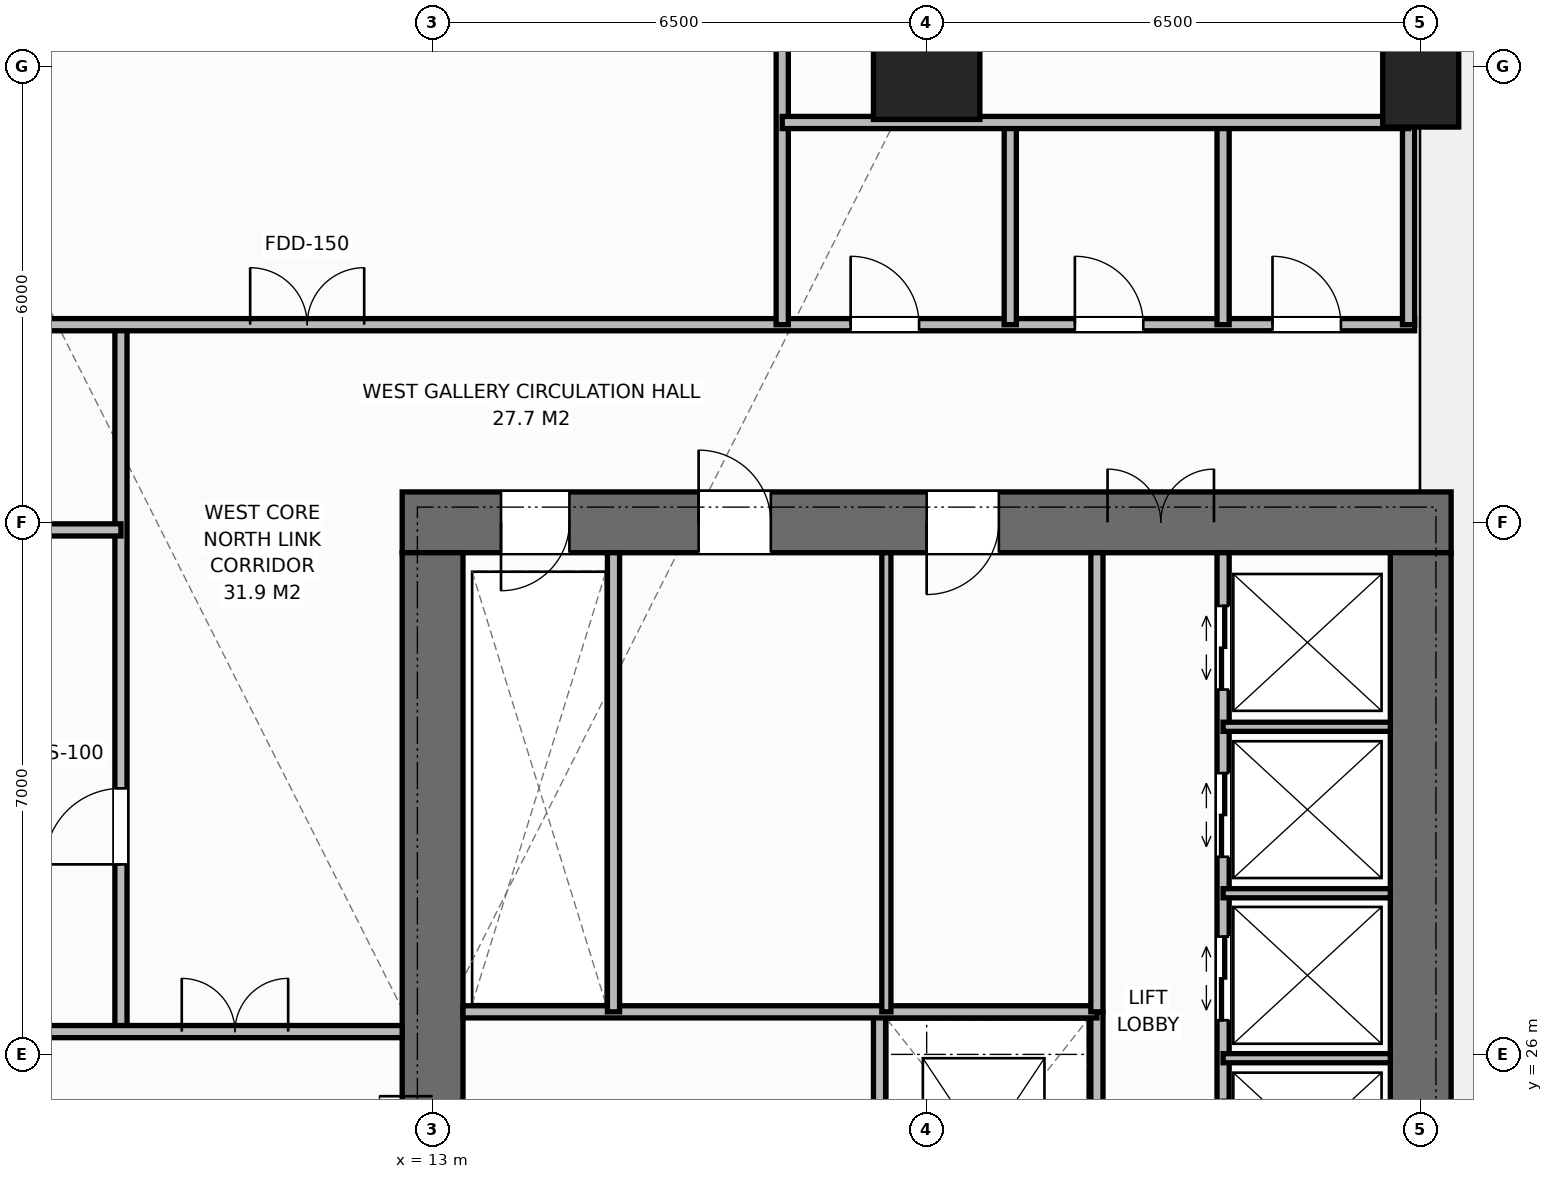
"""IFC4 building model, lengths in metres.
Left out: names, types, materials, properties, quantities, classifications, styles, units other than length and angle.
Written with IfcOpenShell. Run it as: python <this file> out.ifc"""

import sys

from ifc_helpers import new_model, si_unit, direction, frame, frame_2d, origin, origin_2d, place, context, subcontext, project, spatial, rectangle, extrude, element, fill, save


model = new_model("IFC4")
c1 = context("Model", 3, precision=1e-05, world=origin(), true_north=direction((0.0, 1.0)))
c2 = subcontext(c1, "Body", "Model", "MODEL_VIEW")
j1 = project(units=[si_unit("LENGTHUNIT", "METRE"), si_unit("PLANEANGLEUNIT", "RADIAN")], contexts=[c1])
p1 = place(None, origin())
s1 = spatial("IfcSite", under=j1, at=p1, CompositionType="ELEMENT")
p2 = place(p1, origin())
s2 = spatial("IfcBuilding", under=s1, at=p2, CompositionType="ELEMENT")
p3 = place(p2, origin())
s3 = spatial("IfcBuildingStorey", under=s2, at=p3, CompositionType="ELEMENT", Elevation=0.0)
p4 = place(p3, frame((12.6, 33.0, 0.0), z_axis=(0.0, 0.0, 1.0), x_axis=(1.0, 0.0, 0.0)))
e1 = element("IfcWall", 1, at=p4, inside=s3, PredefinedType="SHEAR", context=c2, shape_type="SweptSolid", body=[
    extrude(rectangle(XDim=13.8, YDim=0.8, at=frame_2d((6.9, 0.0))), origin(), (0.0, 0.0, 1.0), 6.0),
])
p5 = place(p4, frame((1.3, 0.0, 0.0)))
e2 = element("IfcOpeningElement", 2, at=p5, cuts=e1, PredefinedType="OPENING", context=c2, shape_type="SweptSolid", body=[
    extrude(rectangle(XDim=0.9, YDim=2.15, at=frame_2d((0.45, 1.075))), frame((0.0, 0.41, 0.0), z_axis=(0.0, -1.0, 0.0), x_axis=(1.0, 0.0, 0.0)), (0.0, 0.0, 1.0), 0.82),
])
p6 = place(p4, frame((3.9, 0.0, 0.0)))
e3 = element("IfcOpeningElement", 3, at=p6, cuts=e1, PredefinedType="OPENING", context=c2, shape_type="SweptSolid", body=[
    extrude(rectangle(XDim=0.95, YDim=2.15, at=frame_2d((0.475, 1.075))), frame((0.0, 0.41, 0.0), z_axis=(0.0, -1.0, 0.0), x_axis=(1.0, 0.0, 0.0)), (0.0, 0.0, 1.0), 0.82),
])
p7 = place(p4, frame((6.9, 0.0, 0.0)))
e4 = element("IfcOpeningElement", 4, at=p7, cuts=e1, PredefinedType="OPENING", context=c2, shape_type="SweptSolid", body=[
    extrude(rectangle(XDim=0.95, YDim=2.15, at=frame_2d((0.475, 1.075))), frame((0.0, 0.41, 0.0), z_axis=(0.0, -1.0, 0.0), x_axis=(1.0, 0.0, 0.0)), (0.0, 0.0, 1.0), 0.82),
])
p8 = place(p4, frame((9.28, 0.0, 0.0)))
e5 = element("IfcOpeningElement", 5, at=p8, cuts=e1, PredefinedType="OPENING", context=c2, shape_type="SweptSolid", body=[
    extrude(rectangle(XDim=1.4, YDim=2.2, at=frame_2d((0.7, 1.1))), frame((0.0, 0.41, 0.0), z_axis=(0.0, -1.0, 0.0), x_axis=(1.0, 0.0, 0.0)), (0.0, 0.0, 1.0), 0.82),
])
p9 = place(p3, frame((13.0, 19.4, 0.0), z_axis=(0.0, 0.0, 1.0), x_axis=(0.0, 1.0, 0.0)))
e6 = element("IfcWall", 6, at=p9, inside=s3, PredefinedType="SHEAR", context=c2, shape_type="SweptSolid", body=[
    extrude(rectangle(XDim=13.2, YDim=0.8, at=frame_2d((6.6, 0.0))), origin(), (0.0, 0.0, 1.0), 6.0),
])
p10 = place(p9, frame((4.65, 0.0, 0.0)))
e7 = element("IfcOpeningElement", 7, at=p10, cuts=e6, PredefinedType="OPENING", context=c2, shape_type="SweptSolid", body=[
    extrude(rectangle(XDim=1.4, YDim=2.2, at=frame_2d((0.7, 1.1))), frame((0.0, 0.41, 0.0), z_axis=(0.0, -1.0, 0.0), x_axis=(1.0, 0.0, 0.0)), (0.0, 0.0, 1.0), 0.82),
])
p11 = place(p3, frame((26.0, 19.4, 0.0), z_axis=(0.0, 0.0, 1.0), x_axis=(0.0, 1.0, 0.0)))
e8 = element("IfcWall", 8, at=p11, inside=s3, PredefinedType="SHEAR", context=c2, shape_type="SweptSolid", body=[
    extrude(rectangle(XDim=13.2, YDim=0.8, at=frame_2d((6.6, 0.0))), origin(), (0.0, 0.0, 1.0), 6.0),
])
p12 = place(p3, frame((19.5, 39.0, 0.0), z_axis=(0.0, 0.0, 1.0), x_axis=(1.0, 0.0, 0.0)))
e9 = element("IfcColumn", 9, at=p12, inside=s3, PredefinedType="COLUMN", context=c2, shape_type="SweptSolid", body=[
    extrude(rectangle(XDim=1.4, YDim=1.4, at=origin_2d()), origin(), (0.0, 0.0, 1.0), 6.0),
])
p13 = place(p3, frame((26.0, 39.0, 0.0), z_axis=(0.0, 0.0, 1.0), x_axis=(1.0, 0.0, 0.0)))
e10 = element("IfcColumn", 10, at=p13, inside=s3, PredefinedType="PILASTER", context=c2, shape_type="SweptSolid", body=[
    extrude(rectangle(XDim=1.0, YDim=1.6, at=origin_2d()), origin(), (0.0, 0.0, 1.0), 6.0),
])
p14 = place(p3, frame((21.74, 23.09, 0.0), z_axis=(0.0, 0.0, 1.0), x_axis=(0.0, 1.0, 0.0)))
e11 = element("IfcWall", 11, at=p14, inside=s3, PredefinedType="STANDARD", context=c2, shape_type="SweptSolid", body=[
    extrude(rectangle(XDim=3.47, YDim=0.16, at=frame_2d((1.735, 0.0))), origin(), (0.0, 0.0, 1.0), 5.72),
])
p15 = place(p3, frame((18.88, 23.09, 0.0), z_axis=(0.0, 0.0, 1.0), x_axis=(0.0, 1.0, 0.0)))
e12 = element("IfcWall", 12, at=p15, inside=s3, PredefinedType="STANDARD", context=c2, shape_type="SweptSolid", body=[
    extrude(rectangle(XDim=3.47, YDim=0.16, at=frame_2d((1.735, 0.0))), origin(), (0.0, 0.0, 1.0), 5.72),
])
p16 = place(p15, frame((1.1, 0.0, 0.0)))
e13 = element("IfcOpeningElement", 13, at=p16, cuts=e12, PredefinedType="OPENING", context=c2, shape_type="SweptSolid", body=[
    extrude(rectangle(XDim=1.1, YDim=2.2, at=frame_2d((0.55, 1.1))), frame((0.0, 0.09, 0.0), z_axis=(0.0, -1.0, 0.0), x_axis=(1.0, 0.0, 0.0)), (0.0, 0.0, 1.0), 0.18),
])
p17 = place(p3, frame((13.4, 26.56, 0.0), z_axis=(0.0, 0.0, 1.0), x_axis=(1.0, 0.0, 0.0)))
e14 = element("IfcWall", 14, at=p17, inside=s3, PredefinedType="STANDARD", context=c2, shape_type="SweptSolid", body=[
    extrude(rectangle(XDim=8.34, YDim=0.16, at=frame_2d((4.17, 0.0))), origin(), (0.0, 0.0, 1.0), 5.72),
])
p18 = place(p3, frame((15.38, 26.56, 0.0), z_axis=(0.0, 0.0, 1.0), x_axis=(0.0, 1.0, 0.0)))
e15 = element("IfcWall", 15, at=p18, inside=s3, PredefinedType="STANDARD", context=c2, shape_type="SweptSolid", body=[
    extrude(rectangle(XDim=6.04, YDim=0.16, at=frame_2d((3.02, 0.0))), origin(), (0.0, 0.0, 1.0), 5.72),
])
p19 = place(p3, frame((18.97, 26.56, 0.0), z_axis=(0.0, 0.0, 1.0), x_axis=(0.0, 1.0, 0.0)))
e16 = element("IfcWall", 16, at=p19, inside=s3, PredefinedType="PARTITIONING", context=c2, shape_type="SweptSolid", body=[
    extrude(rectangle(XDim=6.04, YDim=0.12, at=frame_2d((3.02, 0.0))), origin(), (0.0, 0.0, 1.0), 5.72),
])
p20 = place(p3, frame((21.74, 26.56, 0.0), z_axis=(0.0, 0.0, 1.0), x_axis=(0.0, 1.0, 0.0)))
e17 = element("IfcWall", 17, at=p20, inside=s3, PredefinedType="STANDARD", context=c2, shape_type="SweptSolid", body=[
    extrude(rectangle(XDim=6.04, YDim=0.16, at=frame_2d((3.02, 0.0))), origin(), (0.0, 0.0, 1.0), 5.72),
])
p21 = place(p3, frame((23.4, 19.4, 0.0), z_axis=(0.0, 0.0, 1.0), x_axis=(0.0, 1.0, 0.0)))
e18 = element("IfcWall", 18, at=p21, inside=s3, PredefinedType="STANDARD", context=c2, shape_type="SweptSolid", body=[
    extrude(rectangle(XDim=13.2, YDim=0.16, at=frame_2d((6.6, 0.0))), origin(), (0.0, 0.0, 1.0), 5.72),
])
p22 = place(p21, frame((0.55, 0.0, 0.0)))
e19 = element("IfcOpeningElement", 19, at=p22, cuts=e18, PredefinedType="OPENING", context=c2, shape_type="SweptSolid", body=[
    extrude(rectangle(XDim=1.1, YDim=2.2, at=frame_2d((0.55, 1.1))), frame((0.0, 0.09, 0.0), z_axis=(0.0, -1.0, 0.0), x_axis=(1.0, 0.0, 0.0)), (0.0, 0.0, 1.0), 0.18),
])
p23 = place(p21, frame((2.7, 0.0, 0.0)))
e20 = element("IfcOpeningElement", 20, at=p23, cuts=e18, PredefinedType="OPENING", context=c2, shape_type="SweptSolid", body=[
    extrude(rectangle(XDim=1.1, YDim=2.2, at=frame_2d((0.55, 1.1))), frame((0.0, 0.09, 0.0), z_axis=(0.0, -1.0, 0.0), x_axis=(1.0, 0.0, 0.0)), (0.0, 0.0, 1.0), 0.18),
])
p24 = place(p21, frame((4.9, 0.0, 0.0)))
e21 = element("IfcOpeningElement", 21, at=p24, cuts=e18, PredefinedType="OPENING", context=c2, shape_type="SweptSolid", body=[
    extrude(rectangle(XDim=1.1, YDim=2.2, at=frame_2d((0.55, 1.1))), frame((0.0, 0.09, 0.0), z_axis=(0.0, -1.0, 0.0), x_axis=(1.0, 0.0, 0.0)), (0.0, 0.0, 1.0), 0.18),
])
p25 = place(p21, frame((7.05, 0.0, 0.0)))
e22 = element("IfcOpeningElement", 22, at=p25, cuts=e18, PredefinedType="OPENING", context=c2, shape_type="SweptSolid", body=[
    extrude(rectangle(XDim=1.1, YDim=2.2, at=frame_2d((0.55, 1.1))), frame((0.0, 0.09, 0.0), z_axis=(0.0, -1.0, 0.0), x_axis=(1.0, 0.0, 0.0)), (0.0, 0.0, 1.0), 0.18),
])
p26 = place(p21, frame((9.2, 0.0, 0.0)))
e23 = element("IfcOpeningElement", 23, at=p26, cuts=e18, PredefinedType="OPENING", context=c2, shape_type="SweptSolid", body=[
    extrude(rectangle(XDim=1.1, YDim=2.2, at=frame_2d((0.55, 1.1))), frame((0.0, 0.09, 0.0), z_axis=(0.0, -1.0, 0.0), x_axis=(1.0, 0.0, 0.0)), (0.0, 0.0, 1.0), 0.18),
])
p27 = place(p21, frame((11.4, 0.0, 0.0)))
e24 = element("IfcOpeningElement", 24, at=p27, cuts=e18, PredefinedType="OPENING", context=c2, shape_type="SweptSolid", body=[
    extrude(rectangle(XDim=1.1, YDim=2.2, at=frame_2d((0.55, 1.1))), frame((0.0, 0.09, 0.0), z_axis=(0.0, -1.0, 0.0), x_axis=(1.0, 0.0, 0.0)), (0.0, 0.0, 1.0), 0.18),
])
for number, where, z_axis, x_axis in (
    (25, (23.4, 25.95, 0.0), (0.0, 0.0, 1.0), (1.0, 0.0, 0.0)),
    (26, (23.4, 28.12, 0.0), (0.0, 0.0, 1.0), (1.0, 0.0, 0.0)),
    (27, (23.4, 30.31, 0.0), (0.0, 0.0, 1.0), (1.0, 0.0, 0.0)),
):
    element("IfcWall", number, at=place(p3, frame(where, z_axis=z_axis, x_axis=x_axis)), inside=s3, PredefinedType="PARTITIONING", context=c2, shape_type="SweptSolid", body=[
        extrude(rectangle(XDim=2.2, YDim=0.12, at=frame_2d((1.1, 0.0))), origin(), (0.0, 0.0, 1.0), 5.72),
    ])
p28 = place(p3, frame((8.9, 26.3, 0.0), z_axis=(0.0, 0.0, 1.0), x_axis=(0.0, 1.0, 0.0)))
e28 = element("IfcWall", 28, at=p28, inside=s3, PredefinedType="STANDARD", context=c2, shape_type="SweptSolid", body=[
    extrude(rectangle(XDim=9.3, YDim=0.16, at=frame_2d((4.65, 0.0))), origin(), (0.0, 0.0, 1.0), 5.72),
])
p29 = place(p28, frame((2.2, 0.0, 0.0)))
e29 = element("IfcOpeningElement", 29, at=p29, cuts=e28, PredefinedType="OPENING", context=c2, shape_type="SweptSolid", body=[
    extrude(rectangle(XDim=1.0, YDim=2.15, at=frame_2d((0.5, 1.075))), frame((0.0, 0.09, 0.0), z_axis=(0.0, -1.0, 0.0), x_axis=(1.0, 0.0, 0.0)), (0.0, 0.0, 1.0), 0.18),
])
p30 = place(p3, frame((0.1, 32.9, 0.0), z_axis=(0.0, 0.0, 1.0), x_axis=(1.0, 0.0, 0.0)))
e30 = element("IfcWall", 30, at=p30, inside=s3, PredefinedType="STANDARD", context=c2, shape_type="SweptSolid", body=[
    extrude(rectangle(XDim=8.8, YDim=0.16, at=frame_2d((4.4, 0.0))), origin(), (0.0, 0.0, 1.0), 4.92),
])
p31 = place(p3, frame((0.1, 35.6, 0.0), z_axis=(0.0, 0.0, 1.0), x_axis=(1.0, 0.0, 0.0)))
e31 = element("IfcWall", 31, at=p31, inside=s3, PredefinedType="STANDARD", context=c2, shape_type="SweptSolid", body=[
    extrude(rectangle(XDim=25.82, YDim=0.16, at=frame_2d((12.91, 0.0))), origin(), (0.0, 0.0, 1.0), 5.72),
])
p32 = place(p31, frame((10.5, 0.0, 0.0)))
e32 = element("IfcOpeningElement", 32, at=p32, cuts=e31, PredefinedType="OPENING", context=c2, shape_type="SweptSolid", body=[
    extrude(rectangle(XDim=1.5, YDim=2.2, at=frame_2d((0.75, 1.1))), frame((0.0, 0.09, 0.0), z_axis=(0.0, -1.0, 0.0), x_axis=(1.0, 0.0, 0.0)), (0.0, 0.0, 1.0), 0.18),
])
p33 = place(p31, frame((18.4, 0.0, 0.0)))
e33 = element("IfcOpeningElement", 33, at=p33, cuts=e31, PredefinedType="OPENING", context=c2, shape_type="SweptSolid", body=[
    extrude(rectangle(XDim=0.9, YDim=2.15, at=frame_2d((0.45, 1.075))), frame((0.0, 0.09, 0.0), z_axis=(0.0, -1.0, 0.0), x_axis=(1.0, 0.0, 0.0)), (0.0, 0.0, 1.0), 0.18),
])
p34 = place(p31, frame((21.35, 0.0, 0.0)))
e34 = element("IfcOpeningElement", 34, at=p34, cuts=e31, PredefinedType="OPENING", context=c2, shape_type="SweptSolid", body=[
    extrude(rectangle(XDim=0.9, YDim=2.15, at=frame_2d((0.45, 1.075))), frame((0.0, 0.09, 0.0), z_axis=(0.0, -1.0, 0.0), x_axis=(1.0, 0.0, 0.0)), (0.0, 0.0, 1.0), 0.18),
])
p35 = place(p31, frame((23.95, 0.0, 0.0)))
e35 = element("IfcOpeningElement", 35, at=p35, cuts=e31, PredefinedType="OPENING", context=c2, shape_type="SweptSolid", body=[
    extrude(rectangle(XDim=0.9, YDim=2.15, at=frame_2d((0.45, 1.075))), frame((0.0, 0.09, 0.0), z_axis=(0.0, -1.0, 0.0), x_axis=(1.0, 0.0, 0.0)), (0.0, 0.0, 1.0), 0.18),
])
p36 = place(p3, frame((25.84, 35.6, 0.0), z_axis=(0.0, 0.0, 1.0), x_axis=(0.0, 1.0, 0.0)))
e36 = element("IfcWall", 36, at=p36, inside=s3, PredefinedType="STANDARD", context=c2, shape_type="SweptSolid", body=[
    extrude(rectangle(XDim=16.25, YDim=0.16, at=frame_2d((8.125, 0.0))), origin(), (0.0, 0.0, 1.0), 4.92),
])
p37 = place(p3, frame((17.6, 35.6, 0.0), z_axis=(0.0, 0.0, 1.0), x_axis=(0.0, 1.0, 0.0)))
e37 = element("IfcWall", 37, at=p37, inside=s3, PredefinedType="STANDARD", context=c2, shape_type="SweptSolid", body=[
    extrude(rectangle(XDim=16.25, YDim=0.16, at=frame_2d((8.125, 0.0))), origin(), (0.0, 0.0, 1.0), 5.72),
])
p38 = place(p37, frame((8.0, 0.0, 0.0)))
e38 = element("IfcOpeningElement", 38, at=p38, cuts=e37, PredefinedType="OPENING", context=c2, shape_type="SweptSolid", body=[
    extrude(rectangle(XDim=0.95, YDim=2.15, at=frame_2d((0.475, 1.075))), frame((0.0, 0.09, 0.0), z_axis=(0.0, -1.0, 0.0), x_axis=(1.0, 0.0, 0.0)), (0.0, 0.0, 1.0), 0.18),
])
for number, where, z_axis, x_axis in (
    (39, (20.6, 35.6, 0.0), (0.0, 0.0, 1.0), (0.0, 1.0, 0.0)),
    (40, (23.4, 35.6, 0.0), (0.0, 0.0, 1.0), (0.0, 1.0, 0.0)),
):
    element("IfcWall", number, at=place(p3, frame(where, z_axis=z_axis, x_axis=x_axis)), inside=s3, PredefinedType="STANDARD", context=c2, shape_type="SweptSolid", body=[
        extrude(rectangle(XDim=2.66, YDim=0.16, at=frame_2d((1.33, 0.0))), origin(), (0.0, 0.0, 1.0), 5.72),
    ])
p39 = place(p3, frame((17.6, 38.26, 0.0), z_axis=(0.0, 0.0, 1.0), x_axis=(1.0, 0.0, 0.0)))
e41 = element("IfcWall", 41, at=p39, inside=s3, PredefinedType="STANDARD", context=c2, shape_type="SweptSolid", body=[
    extrude(rectangle(XDim=8.24, YDim=0.16, at=frame_2d((4.12, 0.0))), origin(), (0.0, 0.0, 1.0), 5.72),
])
p40 = place(p3, frame((0.1, 26.3, 0.0), z_axis=(0.0, 0.0, 1.0), x_axis=(1.0, 0.0, 0.0)))
e42 = element("IfcWall", 42, at=p40, inside=s3, PredefinedType="STANDARD", context=c2, shape_type="SweptSolid", body=[
    extrude(rectangle(XDim=12.5, YDim=0.16, at=frame_2d((6.25, 0.0))), origin(), (0.0, 0.0, 1.0), 5.72),
])
p41 = place(p40, frame((9.6, 0.0, 0.0)))
e43 = element("IfcOpeningElement", 43, at=p41, cuts=e42, PredefinedType="OPENING", context=c2, shape_type="SweptSolid", body=[
    extrude(rectangle(XDim=1.4, YDim=2.2, at=frame_2d((0.7, 1.1))), frame((0.0, 0.09, 0.0), z_axis=(0.0, -1.0, 0.0), x_axis=(1.0, 0.0, 0.0)), (0.0, 0.0, 1.0), 0.18),
])
p42 = place(p10, origin())
e44 = element("IfcDoor", 44, at=p42, inside=s3, OperationType="DOUBLE_DOOR_SINGLE_SWING", PredefinedType="DOOR", context=c2, shape_type="SweptSolid", body=[
    extrude(rectangle(XDim=1.4, YDim=2.2, at=frame_2d((0.7, 1.1))), frame((0.0, 0.025, 0.0), z_axis=(0.0, -1.0, 0.0), x_axis=(1.0, 0.0, 0.0)), (0.0, 0.0, 1.0), 0.05),
])
fill(e7, e44)
p43 = place(p5, origin())
e45 = element("IfcDoor", 45, at=p43, inside=s3, OperationType="SINGLE_SWING_RIGHT", PredefinedType="DOOR", context=c2, shape_type="SweptSolid", body=[
    extrude(rectangle(XDim=0.9, YDim=2.15, at=frame_2d((0.45, 1.075))), frame((0.0, -0.075, 0.0), z_axis=(0.0, -1.0, 0.0), x_axis=(1.0, 0.0, 0.0)), (0.0, 0.0, 1.0), 0.05),
])
fill(e2, e45)
p44 = place(p6, origin())
e46 = element("IfcDoor", 46, at=p44, inside=s3, OperationType="SINGLE_SWING_LEFT", PredefinedType="DOOR", context=c2, shape_type="SweptSolid", body=[
    extrude(rectangle(XDim=0.95, YDim=2.15, at=frame_2d((0.475, 1.075))), frame((0.0, -0.075, 0.0), z_axis=(0.0, -1.0, 0.0), x_axis=(1.0, 0.0, 0.0)), (0.0, 0.0, 1.0), 0.05),
])
fill(e3, e46)
p45 = place(p7, origin())
e47 = element("IfcDoor", 47, at=p45, inside=s3, OperationType="SINGLE_SWING_RIGHT", PredefinedType="DOOR", context=c2, shape_type="SweptSolid", body=[
    extrude(rectangle(XDim=0.95, YDim=2.15, at=frame_2d((0.475, 1.075))), frame((0.0, -0.075, 0.0), z_axis=(0.0, -1.0, 0.0), x_axis=(1.0, 0.0, 0.0)), (0.0, 0.0, 1.0), 0.05),
])
fill(e4, e47)
p46 = place(p8, origin())
e48 = element("IfcDoor", 48, at=p46, inside=s3, OperationType="DOUBLE_DOOR_SINGLE_SWING", PredefinedType="DOOR", context=c2, shape_type="SweptSolid", body=[
    extrude(rectangle(XDim=1.4, YDim=2.2, at=frame_2d((0.7, 1.1))), frame((0.0, -0.075, 0.0), z_axis=(0.0, -1.0, 0.0), x_axis=(1.0, 0.0, 0.0)), (0.0, 0.0, 1.0), 0.05),
])
fill(e5, e48)
p47 = place(p25, origin())
e49 = element("IfcDoor", 49, at=p47, inside=s3, OperationType="DOUBLE_DOOR_SLIDING", PredefinedType="DOOR", context=c2, shape_type="SweptSolid", body=[
    extrude(rectangle(XDim=1.1, YDim=2.2, at=frame_2d((0.55, 1.1))), frame((0.0, 0.025, 0.0), z_axis=(0.0, -1.0, 0.0), x_axis=(1.0, 0.0, 0.0)), (0.0, 0.0, 1.0), 0.05),
])
fill(e22, e49)
p48 = place(p26, origin())
e50 = element("IfcDoor", 50, at=p48, inside=s3, OperationType="DOUBLE_DOOR_SLIDING", PredefinedType="DOOR", context=c2, shape_type="SweptSolid", body=[
    extrude(rectangle(XDim=1.1, YDim=2.2, at=frame_2d((0.55, 1.1))), frame((0.0, 0.025, 0.0), z_axis=(0.0, -1.0, 0.0), x_axis=(1.0, 0.0, 0.0)), (0.0, 0.0, 1.0), 0.05),
])
fill(e23, e50)
p49 = place(p27, origin())
e51 = element("IfcDoor", 51, at=p49, inside=s3, OperationType="DOUBLE_DOOR_SLIDING", PredefinedType="DOOR", context=c2, shape_type="SweptSolid", body=[
    extrude(rectangle(XDim=1.1, YDim=2.2, at=frame_2d((0.55, 1.1))), frame((0.0, 0.025, 0.0), z_axis=(0.0, -1.0, 0.0), x_axis=(1.0, 0.0, 0.0)), (0.0, 0.0, 1.0), 0.05),
])
fill(e24, e51)
p50 = place(p29, origin())
e52 = element("IfcDoor", 52, at=p50, inside=s3, OperationType="SINGLE_SWING_LEFT", PredefinedType="DOOR", context=c2, shape_type="SweptSolid", body=[
    extrude(rectangle(XDim=1.0, YDim=2.15, at=frame_2d((0.5, 1.075))), frame((0.0, 0.025, 0.0), z_axis=(0.0, -1.0, 0.0), x_axis=(1.0, 0.0, 0.0)), (0.0, 0.0, 1.0), 0.05),
])
fill(e29, e52)
p51 = place(p32, origin())
e53 = element("IfcDoor", 53, at=p51, inside=s3, OperationType="DOUBLE_DOOR_SINGLE_SWING", PredefinedType="DOOR", context=c2, shape_type="SweptSolid", body=[
    extrude(rectangle(XDim=1.5, YDim=2.2, at=frame_2d((0.75, 1.1))), frame((0.0, 0.025, 0.0), z_axis=(0.0, -1.0, 0.0), x_axis=(1.0, 0.0, 0.0)), (0.0, 0.0, 1.0), 0.05),
])
fill(e32, e53)
p52 = place(p33, origin())
e54 = element("IfcDoor", 54, at=p52, inside=s3, OperationType="SINGLE_SWING_LEFT", PredefinedType="DOOR", context=c2, shape_type="SweptSolid", body=[
    extrude(rectangle(XDim=0.9, YDim=2.15, at=frame_2d((0.45, 1.075))), frame((0.0, 0.025, 0.0), z_axis=(0.0, -1.0, 0.0), x_axis=(1.0, 0.0, 0.0)), (0.0, 0.0, 1.0), 0.05),
])
fill(e33, e54)
p53 = place(p34, origin())
e55 = element("IfcDoor", 55, at=p53, inside=s3, OperationType="SINGLE_SWING_LEFT", PredefinedType="DOOR", context=c2, shape_type="SweptSolid", body=[
    extrude(rectangle(XDim=0.9, YDim=2.15, at=frame_2d((0.45, 1.075))), frame((0.0, 0.025, 0.0), z_axis=(0.0, -1.0, 0.0), x_axis=(1.0, 0.0, 0.0)), (0.0, 0.0, 1.0), 0.05),
])
fill(e34, e55)
p54 = place(p35, origin())
e56 = element("IfcDoor", 56, at=p54, inside=s3, OperationType="SINGLE_SWING_LEFT", PredefinedType="DOOR", context=c2, shape_type="SweptSolid", body=[
    extrude(rectangle(XDim=0.9, YDim=2.15, at=frame_2d((0.45, 1.075))), frame((0.0, 0.025, 0.0), z_axis=(0.0, -1.0, 0.0), x_axis=(1.0, 0.0, 0.0)), (0.0, 0.0, 1.0), 0.05),
])
fill(e35, e56)
p55 = place(p41, origin())
e57 = element("IfcDoor", 57, at=p55, inside=s3, OperationType="DOUBLE_DOOR_SINGLE_SWING", PredefinedType="DOOR", context=c2, shape_type="SweptSolid", body=[
    extrude(rectangle(XDim=1.4, YDim=2.2, at=frame_2d((0.7, 1.1))), frame((0.0, 0.025, 0.0), z_axis=(0.0, -1.0, 0.0), x_axis=(1.0, 0.0, 0.0)), (0.0, 0.0, 1.0), 0.05),
])
fill(e43, e57)
save(model, sys.argv[1])
